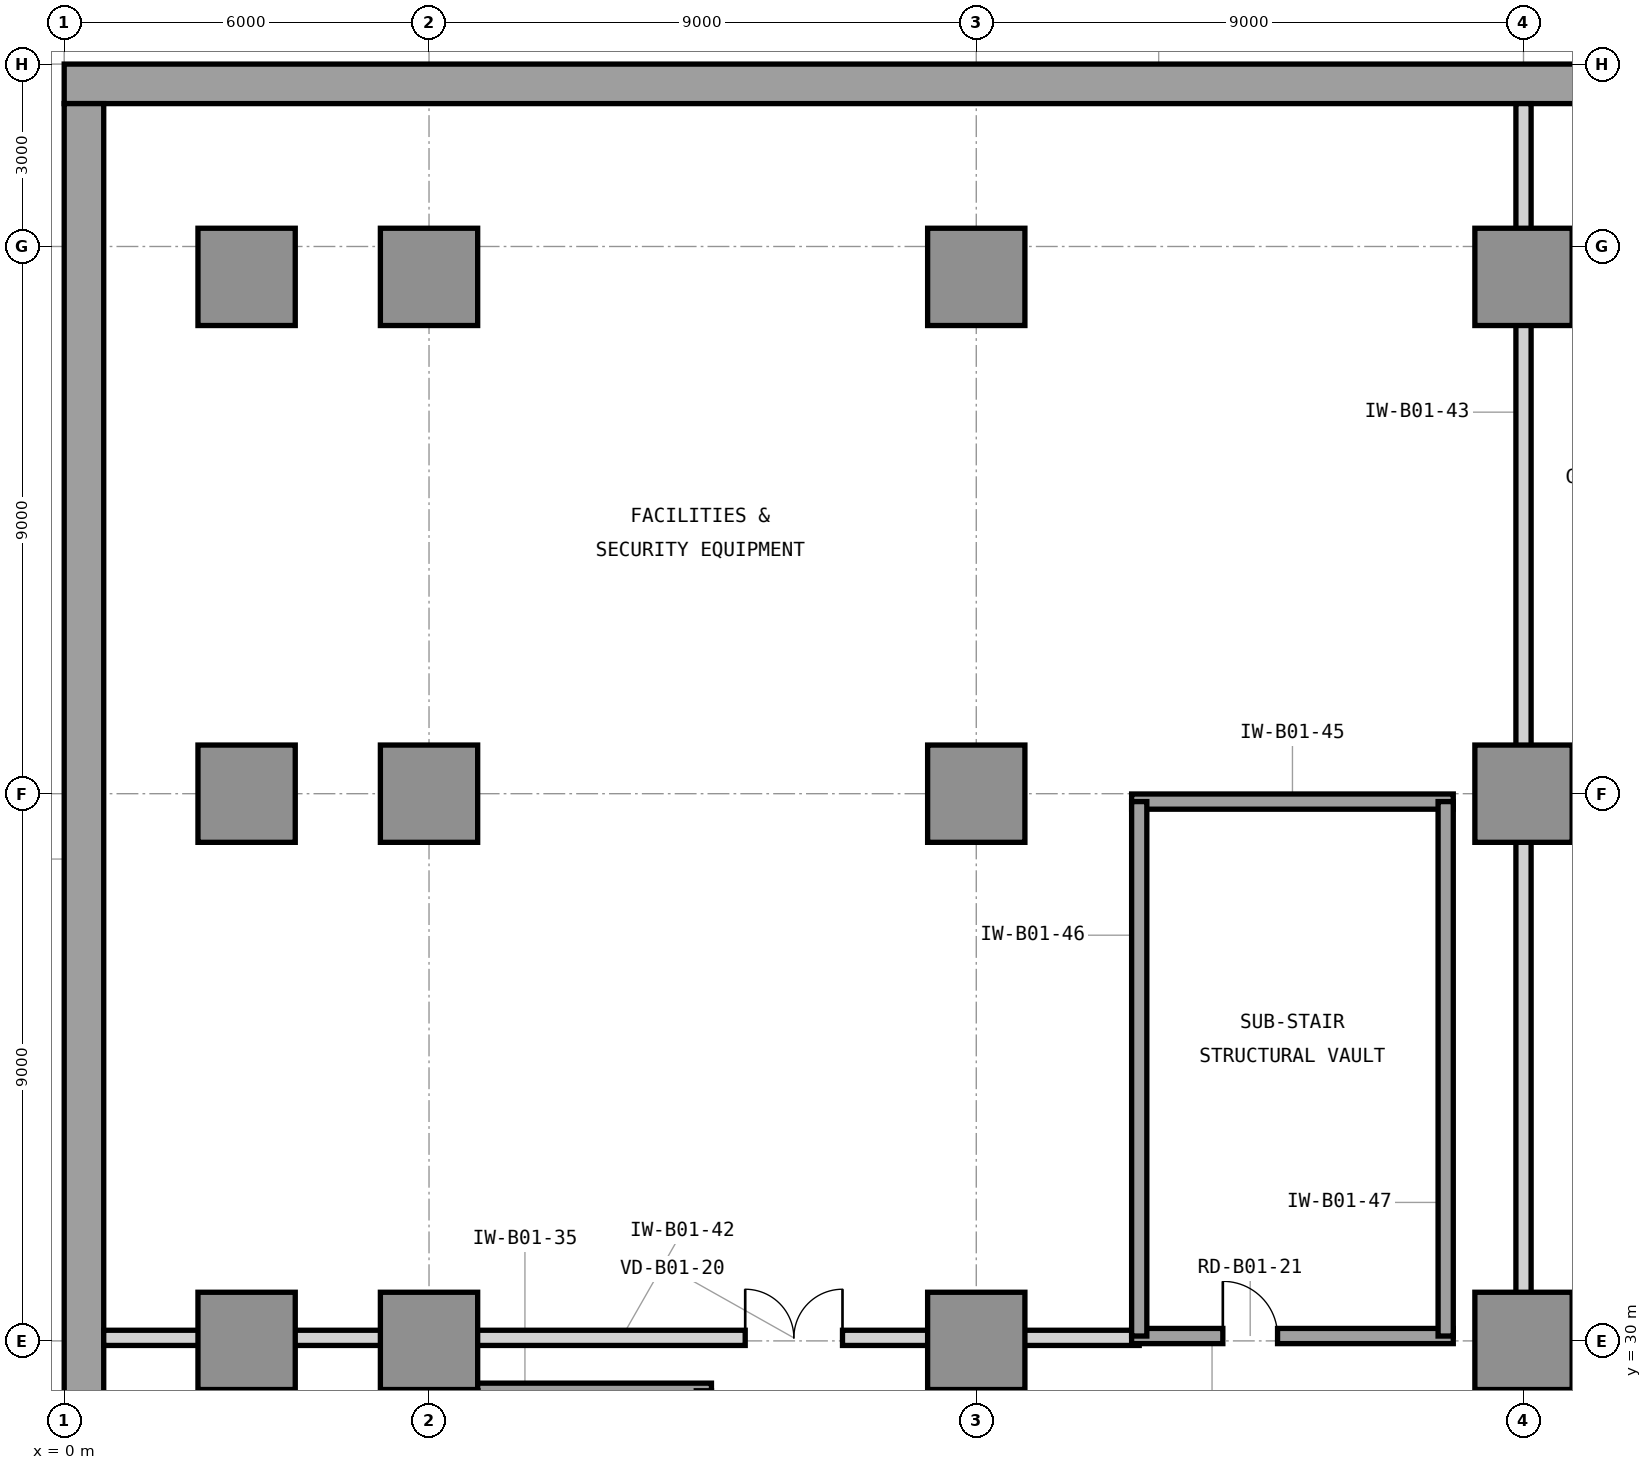
"""IFC4 building model, lengths in metres.
Left out: names, types, materials, properties, quantities, classifications, styles, units other than length and angle.
Written with IfcOpenShell. Run it as: python <this file> out.ifc"""

import sys

from ifc_helpers import new_model, si_unit, direction, frame, frame_2d, origin, origin_2d, place, context, subcontext, project, spatial, rectangle, extrude, element, fill, save


model = new_model("IFC4")
c1 = context("Model", 3, precision=1e-05, world=origin(), true_north=direction((0.0, 1.0)))
c2 = subcontext(c1, "Body", "Model", "MODEL_VIEW")
j1 = project(units=[si_unit("LENGTHUNIT", "METRE"), si_unit("PLANEANGLEUNIT", "RADIAN")], contexts=[c1])
p1 = place(None, origin())
s1 = spatial("IfcSite", under=j1, at=p1, CompositionType="ELEMENT")
p2 = place(p1, origin())
s2 = spatial("IfcBuilding", under=s1, at=p2, CompositionType="ELEMENT")
p3 = place(p2, frame((0.0, 0.0, -4.5)))
s3 = spatial("IfcBuildingStorey", under=s2, at=p3, CompositionType="ELEMENT", Elevation=-4.5)
p4 = place(p3, frame((72.0, 50.675, 0.0), z_axis=(0.0, 0.0, 1.0), x_axis=(-1.0, 0.0, 0.0)))
e1 = element("IfcWall", 1, at=p4, inside=s3, PredefinedType="USERDEFINED", context=c2, shape_type="SweptSolid", body=[
    extrude(rectangle(XDim=72.0, YDim=0.65, at=frame_2d((36.0, 0.0))), origin(), (0.0, 0.0, 1.0), 4.5),
])
p5 = place(p3, frame((0.325, 50.35, 0.0), z_axis=(0.0, 0.0, 1.0), x_axis=(0.0, -1.0, 0.0)))
e2 = element("IfcWall", 2, at=p5, inside=s3, PredefinedType="USERDEFINED", context=c2, shape_type="SweptSolid", body=[
    extrude(rectangle(XDim=49.7, YDim=0.65, at=frame_2d((24.85, 0.0))), origin(), (0.0, 0.0, 1.0), 4.5),
])
for number, where, z_axis, x_axis in (
    (3, (3.0, 30.0, 0.0), (0.0, 0.0, 1.0), (1.0, 0.0, 0.0)),
    (4, (3.0, 39.0, 0.0), (0.0, 0.0, 1.0), (1.0, 0.0, 0.0)),
    (5, (3.0, 47.5, 0.0), (0.0, 0.0, 1.0), (1.0, 0.0, 0.0)),
    (6, (6.0, 30.0, 0.0), (0.0, 0.0, 1.0), (1.0, 0.0, 0.0)),
    (7, (6.0, 39.0, 0.0), (0.0, 0.0, 1.0), (1.0, 0.0, 0.0)),
    (8, (6.0, 47.5, 0.0), (0.0, 0.0, 1.0), (1.0, 0.0, 0.0)),
    (9, (15.0, 30.0, 0.0), (0.0, 0.0, 1.0), (1.0, 0.0, 0.0)),
    (10, (15.0, 39.0, 0.0), (0.0, 0.0, 1.0), (1.0, 0.0, 0.0)),
    (11, (15.0, 47.5, 0.0), (0.0, 0.0, 1.0), (1.0, 0.0, 0.0)),
    (12, (24.0, 30.0, 0.0), (0.0, 0.0, 1.0), (1.0, 0.0, 0.0)),
    (13, (24.0, 39.0, 0.0), (0.0, 0.0, 1.0), (1.0, 0.0, 0.0)),
    (14, (24.0, 47.5, 0.0), (0.0, 0.0, 1.0), (1.0, 0.0, 0.0)),
):
    element("IfcColumn", number, at=place(p3, frame(where, z_axis=z_axis, x_axis=x_axis)), inside=s3, PredefinedType="COLUMN", context=c2, shape_type="SweptSolid", body=[
        extrude(rectangle(XDim=1.6, YDim=1.6, at=origin_2d()), origin(), (0.0, 0.0, 1.0), 4.5),
    ])
p6 = place(p3, frame((6.555, 29.18, 0.0), z_axis=(0.0, 0.0, 1.0), x_axis=(1.0, 0.0, 0.0)))
e15 = element("IfcWall", 15, at=p6, inside=s3, PredefinedType="SHEAR", context=c2, shape_type="SweptSolid", body=[
    extrude(rectangle(XDim=4.09, YDim=0.25, at=frame_2d((2.045, 0.0))), origin(), (0.0, 0.0, 1.0), 4.5),
])
p7 = place(p3, frame((0.65, 30.05, 0.0), z_axis=(0.0, 0.0, 1.0), x_axis=(1.0, 0.0, 0.0)))
e16 = element("IfcWall", 16, at=p7, inside=s3, PredefinedType="PARTITIONING", context=c2, shape_type="SweptSolid", body=[
    extrude(rectangle(XDim=17.03, YDim=0.25, at=frame_2d((8.515, 0.0))), origin(), (0.0, 0.0, 1.0), 3.334),
])
p8 = place(p7, frame((10.55, 0.0, 0.0)))
e17 = element("IfcOpeningElement", 17, at=p8, cuts=e16, PredefinedType="OPENING", context=c2, shape_type="SweptSolid", body=[
    extrude(rectangle(XDim=1.6, YDim=2.3, at=frame_2d((0.8, 1.15))), frame((0.0, 0.135, 0.0), z_axis=(0.0, -1.0, 0.0), x_axis=(1.0, 0.0, 0.0)), (0.0, 0.0, 1.0), 0.27),
])
p9 = place(p3, frame((24.0, 30.05, 0.0), z_axis=(0.0, 0.0, 1.0), x_axis=(0.0, 1.0, 0.0)))
e18 = element("IfcWall", 18, at=p9, inside=s3, PredefinedType="PARTITIONING", context=c2, shape_type="SweptSolid", body=[
    extrude(rectangle(XDim=20.3, YDim=0.25, at=frame_2d((10.15, 0.0))), origin(), (0.0, 0.0, 1.0), 3.334),
])
p10 = place(p3, frame((17.555, 30.08, 0.0), z_axis=(0.0, 0.0, 1.0), x_axis=(1.0, 0.0, 0.0)))
e19 = element("IfcWall", 19, at=p10, inside=s3, PredefinedType="SHEAR", context=c2, shape_type="SweptSolid", body=[
    extrude(rectangle(XDim=5.29, YDim=0.25, at=frame_2d((2.645, 0.0))), origin(), (0.0, 0.0, 1.0), 4.5),
])
p11 = place(p10, frame((1.5, 0.0, 0.0)))
e20 = element("IfcOpeningElement", 20, at=p11, cuts=e19, PredefinedType="OPENING", context=c2, shape_type="SweptSolid", body=[
    extrude(rectangle(XDim=0.9, YDim=2.1, at=frame_2d((0.45, 1.05))), frame((0.0, 0.135, 0.0), z_axis=(0.0, -1.0, 0.0), x_axis=(1.0, 0.0, 0.0)), (0.0, 0.0, 1.0), 0.27),
])
p12 = place(p3, frame((17.555, 38.87, 0.0), z_axis=(0.0, 0.0, 1.0), x_axis=(1.0, 0.0, 0.0)))
e21 = element("IfcWall", 21, at=p12, inside=s3, PredefinedType="SHEAR", context=c2, shape_type="SweptSolid", body=[
    extrude(rectangle(XDim=5.29, YDim=0.25, at=frame_2d((2.645, 0.0))), origin(), (0.0, 0.0, 1.0), 4.5),
])
for number, where, z_axis, x_axis in (
    (22, (17.68, 30.08, 0.0), (0.0, 0.0, 1.0), (0.0, 1.0, 0.0)),
    (23, (22.72, 30.08, 0.0), (0.0, 0.0, 1.0), (0.0, 1.0, 0.0)),
):
    element("IfcWall", number, at=place(p3, frame(where, z_axis=z_axis, x_axis=x_axis)), inside=s3, PredefinedType="SHEAR", context=c2, shape_type="SweptSolid", body=[
        extrude(rectangle(XDim=8.79, YDim=0.25, at=frame_2d((4.395, 0.0))), origin(), (0.0, 0.0, 1.0), 4.5),
    ])
p13 = place(p8, origin())
e24 = element("IfcDoor", 24, at=p13, inside=s3, OperationType="DOUBLE_DOOR_SINGLE_SWING", PredefinedType="DOOR", context=c2, shape_type="SweptSolid", body=[
    extrude(rectangle(XDim=1.6, YDim=2.3, at=frame_2d((0.8, 1.15))), frame((0.0, 0.025, 0.0), z_axis=(0.0, -1.0, 0.0), x_axis=(1.0, 0.0, 0.0)), (0.0, 0.0, 1.0), 0.05),
])
fill(e17, e24)
p14 = place(p11, origin())
e25 = element("IfcDoor", 25, at=p14, inside=s3, OperationType="SINGLE_SWING_LEFT", PredefinedType="TRAPDOOR", context=c2, shape_type="SweptSolid", body=[
    extrude(rectangle(XDim=0.9, YDim=2.1, at=frame_2d((0.45, 1.05))), frame((0.0, 0.025, 0.0), z_axis=(0.0, -1.0, 0.0), x_axis=(1.0, 0.0, 0.0)), (0.0, 0.0, 1.0), 0.05),
])
fill(e20, e25)
save(model, sys.argv[1])
